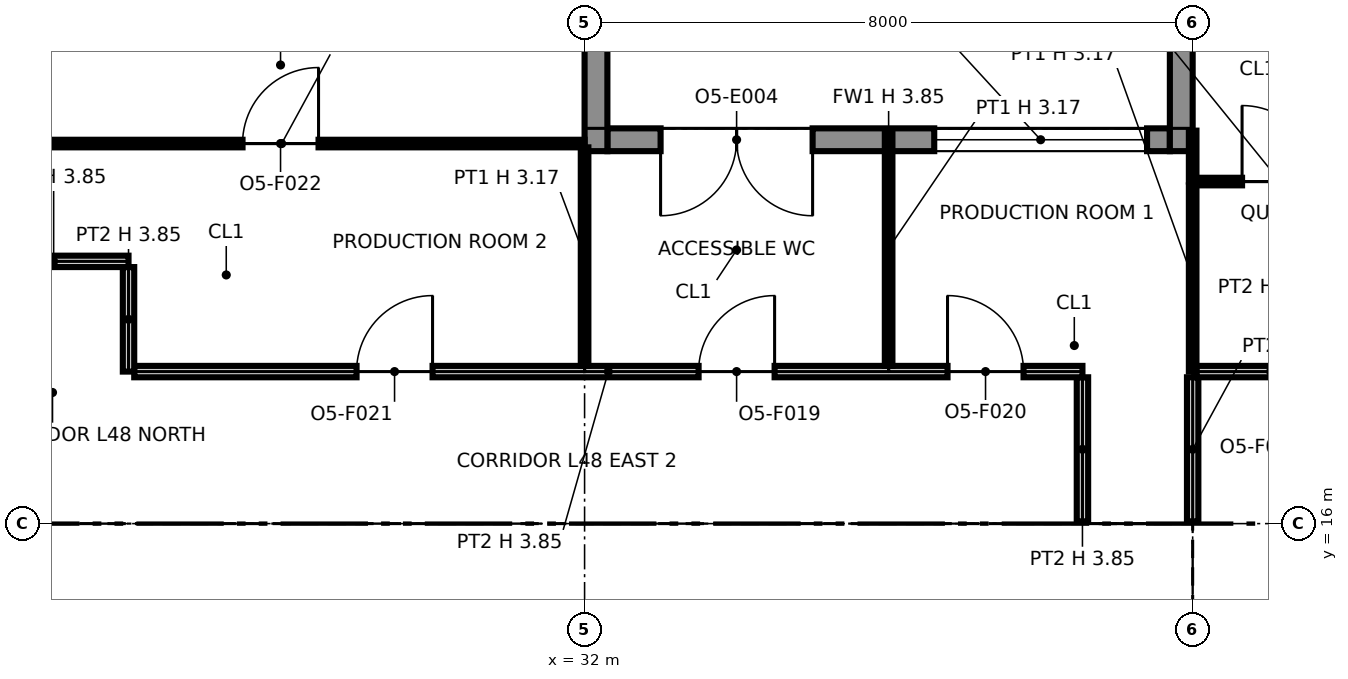
"""IFC4 building model, lengths in metres.
Left out: names, types, materials, properties, quantities, classifications, styles, units other than length and angle.
Written with IfcOpenShell. Run it as: python <this file> out.ifc"""

import sys

from ifc_helpers import new_model, si_unit, direction, frame, frame_2d, origin, origin_2d, place, context, subcontext, project, spatial, polyline, rectangle, i_section, outline, extrude, element, fill, save


model = new_model("IFC4")
c1 = context("Model", 3, precision=1e-05, world=origin(), true_north=direction((0.0, 1.0)))
c2 = subcontext(c1, "Body", "Model", "MODEL_VIEW")
j1 = project(units=[si_unit("LENGTHUNIT", "METRE"), si_unit("PLANEANGLEUNIT", "RADIAN")], contexts=[c1])
p1 = place(None, origin())
s1 = spatial("IfcSite", under=j1, at=p1, CompositionType="ELEMENT")
p2 = place(p1, origin())
s2 = spatial("IfcBuilding", under=s1, at=p2, CompositionType="ELEMENT")
p3 = place(p2, frame((0.0, 0.0, 225.0)))
s3 = spatial("IfcBuildingStorey", under=s2, at=p3, CompositionType="ELEMENT", Elevation=225.0)
for number, where, z_axis, x_axis in (
    (1, (32.0, 16.0, 0.0), (0.0, 0.0, 1.0), (1.0, 0.0, 0.0)),
    (2, (40.0, 16.0, 0.0), (0.0, 0.0, 1.0), (1.0, 0.0, 0.0)),
):
    element("IfcColumn", number, at=place(p3, frame(where, z_axis=z_axis, x_axis=x_axis)), inside=s3, PredefinedType="COLUMN", context=c2, shape_type="SweptSolid", body=[
        extrude(i_section(OverallWidth=0.373, OverallDepth=0.368, WebThickness=0.015, FlangeThickness=0.024, at=origin_2d()), origin(), (0.0, 0.0, 1.0), 3.85),
    ])
p4 = place(p3, frame((39.7, 21.05, 0.0), z_axis=(0.0, 0.0, 1.0), x_axis=(-1.0, 0.0, 0.0)))
e3 = element("IfcWall", 3, at=p4, inside=s3, PredefinedType="SOLIDWALL", context=c2, shape_type="SweptSolid", body=[
    extrude(rectangle(XDim=7.4, YDim=0.3, at=frame_2d((3.7, 0.0))), origin(), (0.0, 0.0, 1.0), 3.85),
])
p5 = place(p4, frame((0.3, 0.0, 0.9)))
e4 = element("IfcOpeningElement", 4, at=p5, cuts=e3, PredefinedType="OPENING", context=c2, shape_type="SweptSolid", body=[
    extrude(rectangle(XDim=2.8, YDim=2.2, at=frame_2d((1.4, 1.1))), frame((0.0, 0.16, 0.0), z_axis=(0.0, -1.0, 0.0), x_axis=(1.0, 0.0, 0.0)), (0.0, 0.0, 1.0), 0.32),
])
p6 = place(p4, frame((4.7, 0.0, 0.0)))
e5 = element("IfcOpeningElement", 5, at=p6, cuts=e3, PredefinedType="OPENING", context=c2, shape_type="SweptSolid", body=[
    extrude(rectangle(XDim=2.0, YDim=2.4, at=frame_2d((1.0, 1.2))), frame((0.0, 0.16, 0.0), z_axis=(0.0, -1.0, 0.0), x_axis=(1.0, 0.0, 0.0)), (0.0, 0.0, 1.0), 0.32),
])
p7 = place(p3, frame((39.85, 23.9, 0.0), z_axis=(0.0, 0.0, 1.0), x_axis=(0.0, -1.0, 0.0)))
e6 = element("IfcWall", 6, at=p7, inside=s3, PredefinedType="SOLIDWALL", context=c2, shape_type="SweptSolid", body=[
    extrude(rectangle(XDim=3.0, YDim=0.3, at=frame_2d((1.5, 0.0))), origin(), (0.0, 0.0, 1.0), 3.171),
])
p8 = place(p3, frame((32.15, 23.9, 0.0), z_axis=(0.0, 0.0, 1.0), x_axis=(0.0, -1.0, 0.0)))
e7 = element("IfcWall", 7, at=p8, inside=s3, PredefinedType="SOLIDWALL", context=c2, shape_type="SweptSolid", body=[
    extrude(rectangle(XDim=3.0, YDim=0.3, at=frame_2d((1.5, 0.0))), origin(), (0.0, 0.0, 1.0), 3.237),
])
p9 = place(p3, frame((24.65, 15.25, 0.0), z_axis=(0.0, 0.0, 1.0), x_axis=(1.0, 0.0, 0.0)))
e8 = element("IfcWall", 8, at=p9, inside=s3, PredefinedType="PARTITIONING", context=c2, shape_type="SweptSolid", body=[
    extrude(outline(polyline([(0.0, 0.0), (14.7, 0.0), (14.7, 3.85), (7.438, 3.85), (7.438, 3.308), (7.262, 3.308), (7.261, 3.85), (0.0, 3.85), (0.0, 0.0)])), frame((0.0, 0.1, 0.0), z_axis=(0.0, -1.0, 0.0), x_axis=(1.0, 0.0, 0.0)), (0.0, 0.0, 1.0), 0.2),
])
p10 = place(p9, frame((2.85, 0.0, 0.0)))
e9 = element("IfcOpeningElement", 9, at=p10, cuts=e8, PredefinedType="OPENING", context=c2, shape_type="SweptSolid", body=[
    extrude(rectangle(XDim=1.8, YDim=2.1, at=frame_2d((0.9, 1.05))), frame((0.0, 0.11, 0.0), z_axis=(0.0, -1.0, 0.0), x_axis=(1.0, 0.0, 0.0)), (0.0, 0.0, 1.0), 0.22),
])
p11 = place(p9, frame((9.95, 0.0, 0.0), z_axis=(0.0, 0.0, 1.0), x_axis=(-1.0, 0.0, 0.0)))
e10 = element("IfcOpeningElement", 10, at=p11, cuts=e8, PredefinedType="OPENING", context=c2, shape_type="SweptSolid", body=[
    extrude(rectangle(XDim=1.4, YDim=2.1, at=frame_2d((0.7, 1.05))), frame((0.0, 0.11, 0.0), z_axis=(0.0, -1.0, 0.0), x_axis=(1.0, 0.0, 0.0)), (0.0, 0.0, 1.0), 0.22),
])
p12 = place(p9, frame((13.4, 0.0, 0.0), z_axis=(0.0, 0.0, 1.0), x_axis=(-1.0, 0.0, 0.0)))
e11 = element("IfcOpeningElement", 11, at=p12, cuts=e8, PredefinedType="OPENING", context=c2, shape_type="SweptSolid", body=[
    extrude(rectangle(XDim=1.4, YDim=2.1, at=frame_2d((0.7, 1.05))), frame((0.0, 0.11, 0.0), z_axis=(0.0, -1.0, 0.0), x_axis=(1.0, 0.0, 0.0)), (0.0, 0.0, 1.0), 0.22),
])
p13 = place(p3, frame((27.325, 13.55, 0.0), z_axis=(0.0, 0.0, 1.0), x_axis=(0.0, 1.0, 0.0)))
e12 = element("IfcWall", 12, at=p13, inside=s3, PredefinedType="PARTITIONING", context=c2, shape_type="SweptSolid", body=[
    extrude(rectangle(XDim=1.6, YDim=0.15, at=frame_2d((0.8, 0.0))), origin(), (0.0, 0.0, 1.0), 3.85),
])
p14 = place(p13, frame((0.3, 0.0, 0.0)))
e13 = element("IfcOpeningElement", 13, at=p14, cuts=e12, PredefinedType="OPENING", context=c2, shape_type="SweptSolid", body=[
    extrude(rectangle(XDim=0.9, YDim=2.1, at=frame_2d((0.45, 1.05))), frame((0.0, 0.085, 0.0), z_axis=(0.0, -1.0, 0.0), x_axis=(1.0, 0.0, 0.0)), (0.0, 0.0, 1.0), 0.17),
])
p15 = place(p3, frame((29.475, 13.55, 0.0), z_axis=(0.0, 0.0, 1.0), x_axis=(0.0, 1.0, 0.0)))
e14 = element("IfcWall", 14, at=p15, inside=s3, PredefinedType="PARTITIONING", context=c2, shape_type="SweptSolid", body=[
    extrude(rectangle(XDim=1.6, YDim=0.15, at=frame_2d((0.8, 0.0))), origin(), (0.0, 0.0, 1.0), 3.85),
])
p16 = place(p15, frame((1.2, 0.0, 0.0), z_axis=(0.0, 0.0, 1.0), x_axis=(-1.0, 0.0, 0.0)))
e15 = element("IfcOpeningElement", 15, at=p16, cuts=e14, PredefinedType="OPENING", context=c2, shape_type="SweptSolid", body=[
    extrude(rectangle(XDim=0.9, YDim=2.1, at=frame_2d((0.45, 1.05))), frame((0.0, 0.085, 0.0), z_axis=(0.0, -1.0, 0.0), x_axis=(1.0, 0.0, 0.0)), (0.0, 0.0, 1.0), 0.17),
])
p17 = place(p3, frame((32.0, 13.55, 0.0), z_axis=(0.0, 0.0, 1.0), x_axis=(0.0, 1.0, 0.0)))
e16 = element("IfcWall", 16, at=p17, inside=s3, PredefinedType="PARTITIONING", context=c2, shape_type="SweptSolid", body=[
    extrude(rectangle(XDim=1.6, YDim=0.6, at=frame_2d((0.8, 0.0))), origin(), (0.0, 0.0, 1.0), 3.308),
])
for number, where, z_axis, x_axis in (
    (17, (35.6, 8.85, 0.0), (0.0, 0.0, 1.0), (0.0, 1.0, 0.0)),
    (18, (39.25, 8.85, 0.0), (0.0, 0.0, 1.0), (0.0, 1.0, 0.0)),
):
    element("IfcWall", number, at=place(p3, frame(where, z_axis=z_axis, x_axis=x_axis)), inside=s3, PredefinedType="PARTITIONING", context=c2, shape_type="SweptSolid", body=[
        extrude(rectangle(XDim=6.3, YDim=0.2, at=frame_2d((3.15, 0.0))), origin(), (0.0, 0.0, 1.0), 3.85),
    ])
p18 = place(p3, frame((38.55, 16.03, 0.0), z_axis=(0.0, 0.0, 1.0), x_axis=(0.0, 1.0, 0.0)))
e19 = element("IfcWall", 19, at=p18, inside=s3, PredefinedType="PARTITIONING", context=c2, shape_type="SweptSolid", body=[
    extrude(rectangle(XDim=1.895, YDim=0.15, at=frame_2d((0.948, 0.0))), origin(), (0.0, 0.0, 1.0), 3.85),
])
p19 = place(p3, frame((40.0, 16.03, 0.0), z_axis=(0.0, 0.0, 1.0), x_axis=(0.0, 1.0, 0.0)))
e20 = element("IfcWall", 20, at=p19, inside=s3, PredefinedType="PARTITIONING", context=c2, shape_type="SweptSolid", body=[
    extrude(rectangle(XDim=1.895, YDim=0.15, at=frame_2d((0.948, 0.0))), origin(), (0.0, 0.0, 1.0), 3.172),
])
p20 = place(p3, frame((26.075, 18.0, 0.0), z_axis=(0.0, 0.0, 1.0), x_axis=(1.0, 0.0, 0.0)))
e21 = element("IfcWall", 21, at=p20, inside=s3, PredefinedType="PARTITIONING", context=c2, shape_type="SweptSolid", body=[
    extrude(rectangle(XDim=12.475, YDim=0.15, at=frame_2d((6.238, 0.0))), origin(), (0.0, 0.0, 1.0), 3.85),
])
p21 = place(p20, frame((7.425, 0.0, 0.0)))
e22 = element("IfcOpeningElement", 22, at=p21, cuts=e21, PredefinedType="OPENING", context=c2, shape_type="SweptSolid", body=[
    extrude(rectangle(XDim=1.0, YDim=2.1, at=frame_2d((0.5, 1.05))), frame((0.0, 0.085, 0.0), z_axis=(0.0, -1.0, 0.0), x_axis=(1.0, 0.0, 0.0)), (0.0, 0.0, 1.0), 0.17),
])
p22 = place(p20, frame((10.7, 0.0, 0.0)))
e23 = element("IfcOpeningElement", 23, at=p22, cuts=e21, PredefinedType="OPENING", context=c2, shape_type="SweptSolid", body=[
    extrude(rectangle(XDim=1.0, YDim=2.1, at=frame_2d((0.5, 1.05))), frame((0.0, 0.085, 0.0), z_axis=(0.0, -1.0, 0.0), x_axis=(1.0, 0.0, 0.0)), (0.0, 0.0, 1.0), 0.17),
])
p23 = place(p20, frame((2.925, 0.0, 0.0)))
e24 = element("IfcOpeningElement", 24, at=p23, cuts=e21, PredefinedType="OPENING", context=c2, shape_type="SweptSolid", body=[
    extrude(rectangle(XDim=1.0, YDim=2.1, at=frame_2d((0.5, 1.05))), frame((0.0, 0.085, 0.0), z_axis=(0.0, -1.0, 0.0), x_axis=(1.0, 0.0, 0.0)), (0.0, 0.0, 1.0), 0.17),
])
p24 = place(p3, frame((26.0, 18.0, 0.0), z_axis=(0.0, 0.0, 1.0), x_axis=(0.0, 1.0, 0.0)))
e25 = element("IfcWall", 25, at=p24, inside=s3, PredefinedType="PARTITIONING", context=c2, shape_type="SweptSolid", body=[
    extrude(rectangle(XDim=1.375, YDim=0.15, at=frame_2d((0.688, 0.0))), origin(), (0.0, 0.0, 1.0), 3.85),
])
p25 = place(p3, frame((32.0, 18.075, 0.0), z_axis=(0.0, 0.0, 1.0), x_axis=(0.0, 1.0, 0.0)))
e26 = element("IfcWall", 26, at=p25, inside=s3, PredefinedType="PARTITIONING", context=c2, shape_type="SweptSolid", body=[
    extrude(rectangle(XDim=2.875, YDim=0.1, at=frame_2d((1.438, 0.0))), origin(), (0.0, 0.0, 1.0), 3.172),
])
p26 = place(p3, frame((36.0, 18.075, 0.0), z_axis=(0.0, 0.0, 1.0), x_axis=(0.0, 1.0, 0.0)))
e27 = element("IfcWall", 27, at=p26, inside=s3, PredefinedType="PARTITIONING", context=c2, shape_type="SweptSolid", body=[
    extrude(rectangle(XDim=3.095, YDim=0.1, at=frame_2d((1.547, 0.0))), origin(), (0.0, 0.0, 1.0), 3.172),
])
p27 = place(p3, frame((40.05, 18.0, 0.0), z_axis=(0.0, 0.0, 1.0), x_axis=(1.0, 0.0, 0.0)))
e28 = element("IfcWall", 28, at=p27, inside=s3, PredefinedType="PARTITIONING", context=c2, shape_type="SweptSolid", body=[
    extrude(rectangle(XDim=1.95, YDim=0.15, at=frame_2d((0.975, 0.0))), origin(), (0.0, 0.0, 1.0), 3.85),
])
p28 = place(p3, frame((40.0, 18.0, 0.0), z_axis=(0.0, 0.0, 1.0), x_axis=(0.0, 1.0, 0.0)))
e29 = element("IfcWall", 29, at=p28, inside=s3, PredefinedType="PARTITIONING", context=c2, shape_type="SweptSolid", body=[
    extrude(rectangle(XDim=2.45, YDim=0.1, at=frame_2d((1.225, 0.0))), origin(), (0.0, 0.0, 1.0), 3.172),
])
p29 = place(p3, frame((24.03, 19.45, 0.0), z_axis=(0.0, 0.0, 1.0), x_axis=(1.0, 0.0, 0.0)))
e30 = element("IfcWall", 30, at=p29, inside=s3, PredefinedType="PARTITIONING", context=c2, shape_type="SweptSolid", body=[
    extrude(rectangle(XDim=1.97, YDim=0.15, at=frame_2d((0.985, 0.0))), origin(), (0.0, 0.0, 1.0), 3.85),
])
p30 = place(p3, frame((40.05, 20.5, 0.0), z_axis=(0.0, 0.0, 1.0), x_axis=(1.0, 0.0, 0.0)))
e31 = element("IfcWall", 31, at=p30, inside=s3, PredefinedType="PARTITIONING", context=c2, shape_type="SweptSolid", body=[
    extrude(rectangle(XDim=3.52, YDim=0.1, at=frame_2d((1.76, 0.0))), origin(), (0.0, 0.0, 1.0), 3.85),
])
p31 = place(p30, frame((0.6, 0.0, 0.0)))
e32 = element("IfcOpeningElement", 32, at=p31, cuts=e31, PredefinedType="OPENING", context=c2, shape_type="SweptSolid", body=[
    extrude(rectangle(XDim=1.0, YDim=2.1, at=frame_2d((0.5, 1.05))), frame((0.0, 0.06, 0.0), z_axis=(0.0, -1.0, 0.0), x_axis=(1.0, 0.0, 0.0)), (0.0, 0.0, 1.0), 0.12),
])
p32 = place(p3, frame((40.0, 20.5, 0.0), z_axis=(0.0, 0.0, 1.0), x_axis=(0.0, 1.0, 0.0)))
e33 = element("IfcWall", 33, at=p32, inside=s3, PredefinedType="PARTITIONING", context=c2, shape_type="SweptSolid", body=[
    extrude(rectangle(XDim=0.67, YDim=0.1, at=frame_2d((0.335, 0.0))), origin(), (0.0, 0.0, 1.0), 3.172),
])
p33 = place(p3, frame((24.03, 21.0, 0.0), z_axis=(0.0, 0.0, 1.0), x_axis=(1.0, 0.0, 0.0)))
e34 = element("IfcWall", 34, at=p33, inside=s3, PredefinedType="PARTITIONING", context=c2, shape_type="SweptSolid", body=[
    extrude(rectangle(XDim=7.97, YDim=0.1, at=frame_2d((3.985, 0.0))), origin(), (0.0, 0.0, 1.0), 3.85),
])
p34 = place(p33, frame((3.47, 0.0, 0.0)))
e35 = element("IfcOpeningElement", 35, at=p34, cuts=e34, PredefinedType="OPENING", context=c2, shape_type="SweptSolid", body=[
    extrude(rectangle(XDim=1.0, YDim=2.1, at=frame_2d((0.5, 1.05))), frame((0.0, 0.06, 0.0), z_axis=(0.0, -1.0, 0.0), x_axis=(1.0, 0.0, 0.0)), (0.0, 0.0, 1.0), 0.12),
])
p35 = place(p5, origin())
e36 = element("IfcWindow", 36, at=p35, inside=s3, PartitioningType="SINGLE_PANEL", PredefinedType="WINDOW", context=c2, shape_type="SweptSolid", body=[
    extrude(rectangle(XDim=2.8, YDim=2.2, at=frame_2d((1.4, 1.1))), frame((0.0, 0.03, 0.0), z_axis=(0.0, -1.0, 0.0), x_axis=(1.0, 0.0, 0.0)), (0.0, 0.0, 1.0), 0.06),
])
fill(e4, e36)
p36 = place(p6, origin())
e37 = element("IfcDoor", 37, at=p36, inside=s3, OperationType="DOUBLE_DOOR_SINGLE_SWING", PredefinedType="DOOR", context=c2, shape_type="SweptSolid", body=[
    extrude(rectangle(XDim=2.0, YDim=2.4, at=frame_2d((1.0, 1.2))), frame((0.0, 0.025, 0.0), z_axis=(0.0, -1.0, 0.0), x_axis=(1.0, 0.0, 0.0)), (0.0, 0.0, 1.0), 0.05),
])
fill(e5, e37)
p37 = place(p10, origin())
e38 = element("IfcDoor", 38, at=p37, inside=s3, OperationType="DOUBLE_DOOR_SINGLE_SWING", PredefinedType="NOTDEFINED", context=c2, shape_type="SweptSolid", body=[
    extrude(rectangle(XDim=1.8, YDim=2.1, at=frame_2d((0.9, 1.05))), frame((0.0, 0.025, 0.0), z_axis=(0.0, -1.0, 0.0), x_axis=(1.0, 0.0, 0.0)), (0.0, 0.0, 1.0), 0.05),
])
fill(e9, e38)
p38 = place(p11, origin())
e39 = element("IfcDoor", 39, at=p38, inside=s3, OperationType="DOUBLE_DOOR_SINGLE_SWING", PredefinedType="NOTDEFINED", context=c2, shape_type="SweptSolid", body=[
    extrude(rectangle(XDim=1.4, YDim=2.1, at=frame_2d((0.7, 1.05))), frame((0.0, 0.025, 0.0), z_axis=(0.0, -1.0, 0.0), x_axis=(1.0, 0.0, 0.0)), (0.0, 0.0, 1.0), 0.05),
])
fill(e10, e39)
p39 = place(p12, origin())
e40 = element("IfcDoor", 40, at=p39, inside=s3, OperationType="DOUBLE_DOOR_SINGLE_SWING", PredefinedType="NOTDEFINED", context=c2, shape_type="SweptSolid", body=[
    extrude(rectangle(XDim=1.4, YDim=2.1, at=frame_2d((0.7, 1.05))), frame((0.0, 0.025, 0.0), z_axis=(0.0, -1.0, 0.0), x_axis=(1.0, 0.0, 0.0)), (0.0, 0.0, 1.0), 0.05),
])
fill(e11, e40)
p40 = place(p31, origin())
e41 = element("IfcDoor", 41, at=p40, inside=s3, OperationType="SINGLE_SWING_LEFT", PredefinedType="DOOR", context=c2, shape_type="SweptSolid", body=[
    extrude(rectangle(XDim=1.0, YDim=2.1, at=frame_2d((0.5, 1.05))), frame((0.0, 0.025, 0.0), z_axis=(0.0, -1.0, 0.0), x_axis=(1.0, 0.0, 0.0)), (0.0, 0.0, 1.0), 0.05),
])
fill(e32, e41)
p41 = place(p21, origin())
e42 = element("IfcDoor", 42, at=p41, inside=s3, OperationType="SINGLE_SWING_RIGHT", PredefinedType="DOOR", context=c2, shape_type="SweptSolid", body=[
    extrude(rectangle(XDim=1.0, YDim=2.1, at=frame_2d((0.5, 1.05))), frame((0.0, 0.025, 0.0), z_axis=(0.0, -1.0, 0.0), x_axis=(1.0, 0.0, 0.0)), (0.0, 0.0, 1.0), 0.05),
])
fill(e22, e42)
p42 = place(p22, origin())
e43 = element("IfcDoor", 43, at=p42, inside=s3, OperationType="SINGLE_SWING_LEFT", PredefinedType="DOOR", context=c2, shape_type="SweptSolid", body=[
    extrude(rectangle(XDim=1.0, YDim=2.1, at=frame_2d((0.5, 1.05))), frame((0.0, 0.025, 0.0), z_axis=(0.0, -1.0, 0.0), x_axis=(1.0, 0.0, 0.0)), (0.0, 0.0, 1.0), 0.05),
])
fill(e23, e43)
p43 = place(p23, origin())
e44 = element("IfcDoor", 44, at=p43, inside=s3, OperationType="SINGLE_SWING_RIGHT", PredefinedType="DOOR", context=c2, shape_type="SweptSolid", body=[
    extrude(rectangle(XDim=1.0, YDim=2.1, at=frame_2d((0.5, 1.05))), frame((0.0, 0.025, 0.0), z_axis=(0.0, -1.0, 0.0), x_axis=(1.0, 0.0, 0.0)), (0.0, 0.0, 1.0), 0.05),
])
fill(e24, e44)
p44 = place(p34, origin())
e45 = element("IfcDoor", 45, at=p44, inside=s3, OperationType="SINGLE_SWING_RIGHT", PredefinedType="DOOR", context=c2, shape_type="SweptSolid", body=[
    extrude(rectangle(XDim=1.0, YDim=2.1, at=frame_2d((0.5, 1.05))), frame((0.0, 0.025, 0.0), z_axis=(0.0, -1.0, 0.0), x_axis=(1.0, 0.0, 0.0)), (0.0, 0.0, 1.0), 0.05),
])
fill(e35, e45)
save(model, sys.argv[1])
